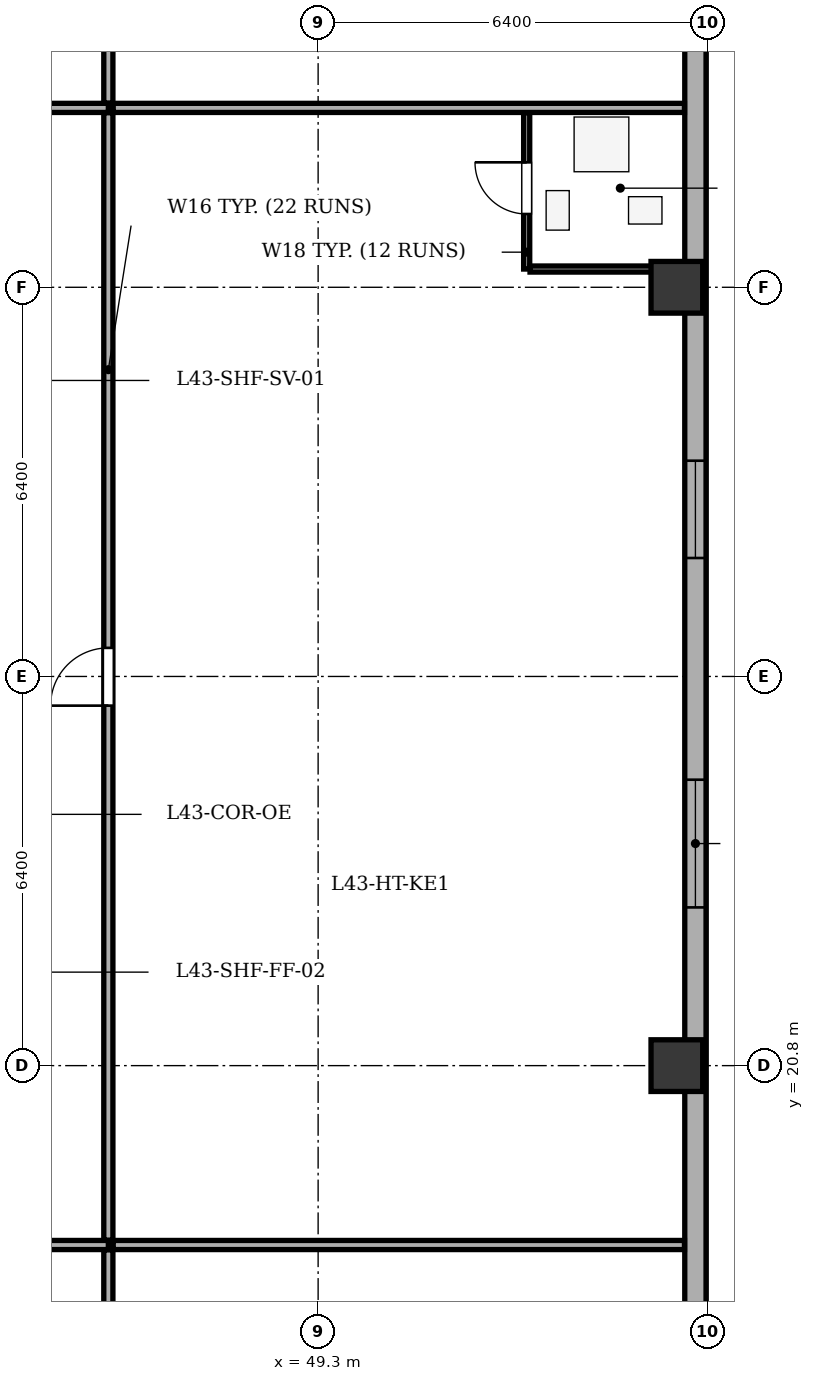
"""IFC4 building model, lengths in metres.
Left out: names, types, materials, properties, quantities, classifications, styles, units other than length and angle.
Written with IfcOpenShell. Run it as: python <this file> out.ifc"""

import sys

from ifc_helpers import new_model, si_unit, direction, frame, frame_2d, origin, origin_2d, place, context, subcontext, project, spatial, rectangle, extrude, element, fill, save


model = new_model("IFC4")
c1 = context("Model", 3, precision=1e-05, world=origin(), true_north=direction((0.0, 1.0)))
c2 = subcontext(c1, "Body", "Model", "MODEL_VIEW")
j1 = project(units=[si_unit("LENGTHUNIT", "METRE"), si_unit("PLANEANGLEUNIT", "RADIAN")], contexts=[c1])
p1 = place(None, origin())
s1 = spatial("IfcSite", under=j1, at=p1, CompositionType="ELEMENT")
p2 = place(p1, origin())
s2 = spatial("IfcBuilding", under=s1, at=p2, CompositionType="ELEMENT")
p3 = place(p2, frame((0.0, 0.0, 169.3)))
s3 = spatial("IfcBuildingStorey", under=s2, at=p3, CompositionType="ELEMENT", Elevation=169.3)
for number, where, z_axis, x_axis in (
    (1, (55.2, 20.8, 0.0), (0.0, 0.0, 1.0), (1.0, 0.0, 0.0)),
    (2, (55.2, 33.6, 0.0), (0.0, 0.0, 1.0), (1.0, 0.0, 0.0)),
):
    element("IfcColumn", number, at=place(p3, frame(where, z_axis=z_axis, x_axis=x_axis)), inside=s3, PredefinedType="COLUMN", context=c2, shape_type="SweptSolid", body=[
        extrude(rectangle(XDim=0.85, YDim=0.85, at=origin_2d()), origin(), (0.0, 0.0, 1.0), 3.5),
    ])
p4 = place(p3, frame((55.505, 47.9, 0.0), z_axis=(0.0, 0.0, 1.0), x_axis=(0.0, -1.0, 0.0)))
e3 = element("IfcWall", 3, at=p4, inside=s3, PredefinedType="STANDARD", context=c2, shape_type="SweptSolid", body=[
    extrude(rectangle(XDim=35.0, YDim=0.35, at=frame_2d((17.5, 0.0))), origin(), (0.0, 0.0, 1.0), 2.785),
])
p5 = place(p4, frame((2.595, 0.0, 0.75)))
e4 = element("IfcOpeningElement", 4, at=p5, cuts=e3, PredefinedType="OPENING", context=c2, shape_type="SweptSolid", body=[
    extrude(rectangle(XDim=1.6, YDim=1.75, at=frame_2d((0.8, 0.875))), frame((0.0, 0.185, 0.0), z_axis=(0.0, -1.0, 0.0), x_axis=(1.0, 0.0, 0.0)), (0.0, 0.0, 1.0), 0.37),
])
p6 = place(p4, frame((7.181, 0.0, 0.75)))
e5 = element("IfcOpeningElement", 5, at=p6, cuts=e3, PredefinedType="OPENING", context=c2, shape_type="SweptSolid", body=[
    extrude(rectangle(XDim=2.1, YDim=1.75, at=frame_2d((1.05, 0.875))), frame((0.0, 0.185, 0.0), z_axis=(0.0, -1.0, 0.0), x_axis=(1.0, 0.0, 0.0)), (0.0, 0.0, 1.0), 0.37),
])
p7 = place(p4, frame((17.152, 0.0, 0.75)))
e6 = element("IfcOpeningElement", 6, at=p7, cuts=e3, PredefinedType="OPENING", context=c2, shape_type="SweptSolid", body=[
    extrude(rectangle(XDim=1.6, YDim=1.75, at=frame_2d((0.8, 0.875))), frame((0.0, 0.185, 0.0), z_axis=(0.0, -1.0, 0.0), x_axis=(1.0, 0.0, 0.0)), (0.0, 0.0, 1.0), 0.37),
])
p8 = place(p4, frame((22.398, 0.0, 0.75)))
e7 = element("IfcOpeningElement", 7, at=p8, cuts=e3, PredefinedType="OPENING", context=c2, shape_type="SweptSolid", body=[
    extrude(rectangle(XDim=2.1, YDim=1.75, at=frame_2d((1.05, 0.875))), frame((0.0, 0.185, 0.0), z_axis=(0.0, -1.0, 0.0), x_axis=(1.0, 0.0, 0.0)), (0.0, 0.0, 1.0), 0.37),
])
p9 = place(p4, frame((31.588, 0.0, 0.75)))
e8 = element("IfcOpeningElement", 8, at=p9, cuts=e3, PredefinedType="OPENING", context=c2, shape_type="SweptSolid", body=[
    extrude(rectangle(XDim=1.6, YDim=1.75, at=frame_2d((0.8, 0.875))), frame((0.0, 0.185, 0.0), z_axis=(0.0, -1.0, 0.0), x_axis=(1.0, 0.0, 0.0)), (0.0, 0.0, 1.0), 0.37),
])
p10 = place(p3, frame((38.102, 17.85, 0.0), z_axis=(0.0, 0.0, 1.0), x_axis=(1.0, 0.0, 0.0)))
e9 = element("IfcWall", 9, at=p10, inside=s3, PredefinedType="PARTITIONING", context=c2, shape_type="SweptSolid", body=[
    extrude(rectangle(XDim=7.748, YDim=0.15, at=frame_2d((3.874, 0.0))), origin(), (0.0, 0.0, 1.0), 3.2),
])
p11 = place(p10, frame((3.394, 0.0, 0.0)))
e10 = element("IfcOpeningElement", 10, at=p11, cuts=e9, PredefinedType="OPENING", context=c2, shape_type="SweptSolid", body=[
    extrude(rectangle(XDim=0.95, YDim=2.1, at=frame_2d((0.475, 1.05))), frame((0.0, 0.085, 0.0), z_axis=(0.0, -1.0, 0.0), x_axis=(1.0, 0.0, 0.0)), (0.0, 0.0, 1.0), 0.17),
])
p12 = place(p3, frame((45.85, 8.275, 0.0), z_axis=(0.0, 0.0, 1.0), x_axis=(0.0, 1.0, 0.0)))
e11 = element("IfcWall", 11, at=p12, inside=s3, PredefinedType="PARTITIONING", context=c2, shape_type="SweptSolid", body=[
    extrude(rectangle(XDim=9.495, YDim=0.15, at=frame_2d((4.748, 0.0))), origin(), (0.0, 0.0, 1.0), 3.2),
])
p13 = place(p3, frame((35.377, 36.55, 0.0), z_axis=(0.0, 0.0, 1.0), x_axis=(1.0, 0.0, 0.0)))
e12 = element("IfcWall", 12, at=p13, inside=s3, PredefinedType="PARTITIONING", context=c2, shape_type="SweptSolid", body=[
    extrude(rectangle(XDim=10.473, YDim=0.15, at=frame_2d((5.237, 0.0))), origin(), (0.0, 0.0, 1.0), 3.2),
])
p14 = place(p13, frame((4.676, 0.0, 0.0)))
e13 = element("IfcOpeningElement", 13, at=p14, cuts=e12, PredefinedType="OPENING", context=c2, shape_type="SweptSolid", body=[
    extrude(rectangle(XDim=1.0, YDim=2.1, at=frame_2d((0.5, 1.05))), frame((0.0, 0.085, 0.0), z_axis=(0.0, -1.0, 0.0), x_axis=(1.0, 0.0, 0.0)), (0.0, 0.0, 1.0), 0.17),
])
p15 = place(p3, frame((45.85, 36.63, 0.0), z_axis=(0.0, 0.0, 1.0), x_axis=(0.0, 1.0, 0.0)))
e14 = element("IfcWall", 14, at=p15, inside=s3, PredefinedType="PARTITIONING", context=c2, shape_type="SweptSolid", body=[
    extrude(rectangle(XDim=15.895, YDim=0.15, at=frame_2d((7.948, 0.0))), origin(), (0.0, 0.0, 1.0), 3.2),
])
for number, where, z_axis, x_axis in (
    (15, (45.93, 17.85, 0.0), (0.0, 0.0, 1.0), (1.0, 0.0, 0.0)),
    (16, (45.93, 36.55, 0.0), (0.0, 0.0, 1.0), (1.0, 0.0, 0.0)),
):
    element("IfcWall", number, at=place(p3, frame(where, z_axis=z_axis, x_axis=x_axis)), inside=s3, PredefinedType="PARTITIONING", context=c2, shape_type="SweptSolid", body=[
        extrude(rectangle(XDim=9.395, YDim=0.15, at=frame_2d((4.698, 0.0))), origin(), (0.0, 0.0, 1.0), 3.2),
    ])
p16 = place(p3, frame((45.85, 17.93, 0.0), z_axis=(0.0, 0.0, 1.0), x_axis=(0.0, 1.0, 0.0)))
e17 = element("IfcWall", 17, at=p16, inside=s3, PredefinedType="PARTITIONING", context=c2, shape_type="SweptSolid", body=[
    extrude(rectangle(XDim=18.54, YDim=0.15, at=frame_2d((9.27, 0.0))), origin(), (0.0, 0.0, 1.0), 3.2),
])
p17 = place(p16, frame((8.79, 0.0, 0.0)))
e18 = element("IfcOpeningElement", 18, at=p17, cuts=e17, PredefinedType="OPENING", context=c2, shape_type="SweptSolid", body=[
    extrude(rectangle(XDim=0.95, YDim=2.1, at=frame_2d((0.475, 1.05))), frame((0.0, 0.085, 0.0), z_axis=(0.0, -1.0, 0.0), x_axis=(1.0, 0.0, 0.0)), (0.0, 0.0, 1.0), 0.17),
])
p18 = place(p3, frame((52.73, 33.9, 0.0), z_axis=(0.0, 0.0, 1.0), x_axis=(0.0, 1.0, 0.0)))
e19 = element("IfcWall", 19, at=p18, inside=s3, PredefinedType="PARTITIONING", context=c2, shape_type="SweptSolid", body=[
    extrude(rectangle(XDim=2.57, YDim=0.1, at=frame_2d((1.285, 0.0))), origin(), (0.0, 0.0, 1.0), 3.2),
])
p19 = place(p18, frame((0.905, 0.0, 0.0)))
e20 = element("IfcOpeningElement", 20, at=p19, cuts=e19, PredefinedType="OPENING", context=c2, shape_type="SweptSolid", body=[
    extrude(rectangle(XDim=0.85, YDim=2.05, at=frame_2d((0.425, 1.025))), frame((0.0, 0.06, 0.0), z_axis=(0.0, -1.0, 0.0), x_axis=(1.0, 0.0, 0.0)), (0.0, 0.0, 1.0), 0.12),
])
p20 = place(p3, frame((52.785, 33.9, 0.0), z_axis=(0.0, 0.0, 1.0), x_axis=(1.0, 0.0, 0.0)))
e21 = element("IfcWall", 21, at=p20, inside=s3, PredefinedType="PARTITIONING", context=c2, shape_type="SweptSolid", body=[
    extrude(rectangle(XDim=2.54, YDim=0.1, at=frame_2d((1.27, 0.0))), origin(), (0.0, 0.0, 1.0), 2.535),
])
p21 = place(p7, origin())
e22 = element("IfcWindow", 22, at=p21, inside=s3, PartitioningType="SINGLE_PANEL", PredefinedType="WINDOW", context=c2, shape_type="SweptSolid", body=[
    extrude(rectangle(XDim=1.6, YDim=1.75, at=frame_2d((0.8, 0.875))), frame((0.0, -0.01, 0.0), z_axis=(0.0, -1.0, 0.0), x_axis=(1.0, 0.0, 0.0)), (0.0, 0.0, 1.0), 0.06),
])
fill(e6, e22)
p22 = place(p8, origin())
e23 = element("IfcWindow", 23, at=p22, inside=s3, PartitioningType="SINGLE_PANEL", PredefinedType="WINDOW", context=c2, shape_type="SweptSolid", body=[
    extrude(rectangle(XDim=2.1, YDim=1.75, at=frame_2d((1.05, 0.875))), frame((0.0, -0.01, 0.0), z_axis=(0.0, -1.0, 0.0), x_axis=(1.0, 0.0, 0.0)), (0.0, 0.0, 1.0), 0.06),
])
fill(e7, e23)
p23 = place(p19, origin())
e24 = element("IfcDoor", 24, at=p23, inside=s3, OperationType="SINGLE_SWING_RIGHT", PredefinedType="DOOR", context=c2, shape_type="SweptSolid", body=[
    extrude(rectangle(XDim=0.85, YDim=2.05, at=frame_2d((0.425, 1.025))), frame((0.0, 0.025, 0.0), z_axis=(0.0, -1.0, 0.0), x_axis=(1.0, 0.0, 0.0)), (0.0, 0.0, 1.0), 0.05),
])
fill(e20, e24)
p24 = place(p17, origin())
e25 = element("IfcDoor", 25, at=p24, inside=s3, OperationType="SINGLE_SWING_LEFT", PredefinedType="DOOR", context=c2, shape_type="SweptSolid", body=[
    extrude(rectangle(XDim=0.95, YDim=2.1, at=frame_2d((0.475, 1.05))), frame((0.0, 0.025, 0.0), z_axis=(0.0, -1.0, 0.0), x_axis=(1.0, 0.0, 0.0)), (0.0, 0.0, 1.0), 0.05),
])
fill(e18, e25)
save(model, sys.argv[1])
